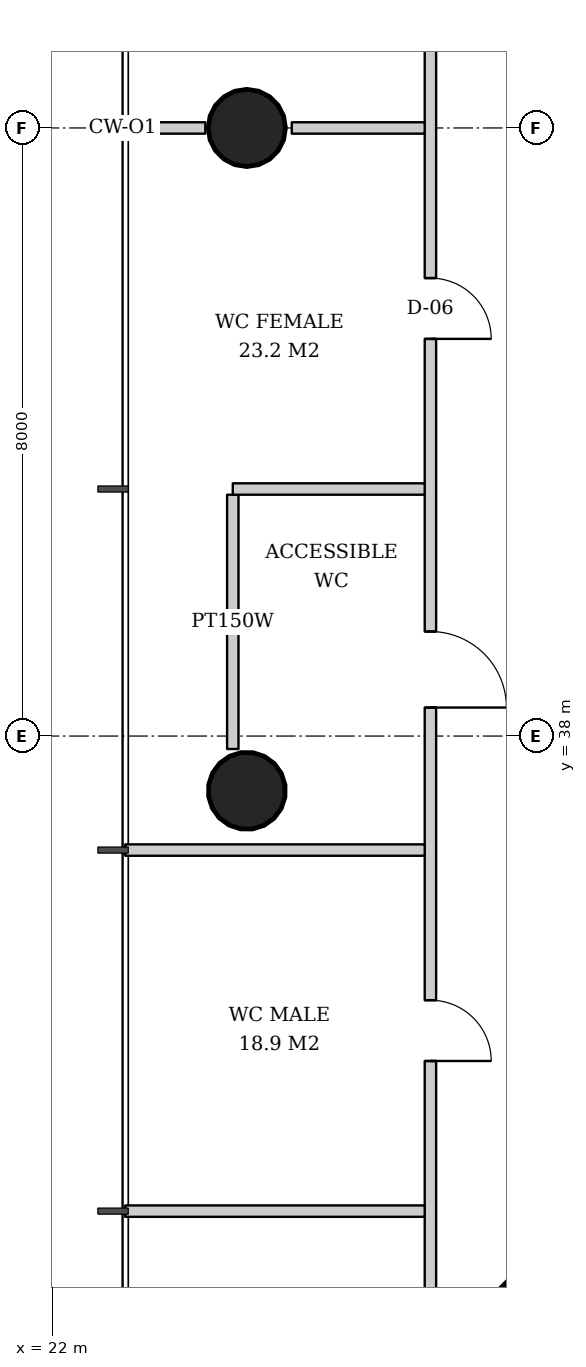
"""IFC4 building model, lengths in metres.
Left out: names, types, materials, properties, quantities, classifications, styles, units other than length and angle.
Written with IfcOpenShell. Run it as: python <this file> out.ifc"""

import sys

from ifc_helpers import new_model, si_unit, direction, frame, frame_2d, origin, origin_2d, place, context, subcontext, project, spatial, rectangle, hollow_circle, extrude, element, fill, save


model = new_model("IFC4")
c1 = context("Model", 3, precision=1e-05, world=origin(), true_north=direction((0.0, 1.0)))
c2 = subcontext(c1, "Body", "Model", "MODEL_VIEW")
j1 = project(units=[si_unit("LENGTHUNIT", "METRE"), si_unit("PLANEANGLEUNIT", "RADIAN")], contexts=[c1])
p1 = place(None, origin())
s1 = spatial("IfcSite", under=j1, at=p1, CompositionType="ELEMENT")
p2 = place(p1, origin())
s2 = spatial("IfcBuilding", under=s1, at=p2, CompositionType="ELEMENT")
p3 = place(p2, frame((0.0, 0.0, 131.2)))
s3 = spatial("IfcBuildingStorey", under=s2, at=p3, CompositionType="ELEMENT", Elevation=131.2)
p4 = place(p3, frame((28.621, 29.621, 0.0), z_axis=(0.031962158256, 0.031962158256, 0.998977898093), x_axis=(-0.707106781187, 0.707106781187, 0.0)))
e1 = element("IfcColumn", 1, at=p4, inside=s3, PredefinedType="COLUMN", context=c2, shape_type="SweptSolid", body=[
    extrude(rectangle(XDim=2.6, YDim=2.6, at=origin_2d()), origin(), (0.0, 0.0, 1.0), 3.804),
])
p5 = place(p3, frame((24.521, 46.0, 0.0), z_axis=(0.031914348339, 0.0, 0.999490607445), x_axis=(0.0, 1.0, 0.0)))
e2 = element("IfcColumn", 2, at=p5, inside=s3, PredefinedType="COLUMN", context=c2, shape_type="SweptSolid", body=[
    extrude(hollow_circle(Radius=0.508, WallThickness=0.04, at=origin_2d()), origin(), (0.0, 0.0, 1.0), 3.802),
])
p6 = place(p3, frame((24.521, 37.261, 0.0), z_axis=(0.031910269556, 0.015987237665, 0.999362868496), x_axis=(-0.447933021895, 0.894067115991, 0.0)))
e3 = element("IfcColumn", 3, at=p6, inside=s3, PredefinedType="COLUMN", context=c2, shape_type="SweptSolid", body=[
    extrude(hollow_circle(Radius=0.508, WallThickness=0.04, at=origin_2d()), origin(), (0.0, 0.0, 1.0), 3.802),
])
p7 = place(p3, frame((24.375, 41.175, 0.0), z_axis=(0.0, 0.0, 1.0), x_axis=(0.0, -1.0, 0.0)))
e4 = element("IfcWall", 4, at=p7, inside=s3, PredefinedType="PARTITIONING", context=c2, shape_type="SweptSolid", body=[
    extrude(rectangle(XDim=3.346, YDim=0.15, at=frame_2d((1.673, 0.0))), origin(), (0.0, 0.0, 1.0), 3.62),
])
p8 = place(p3, frame((26.975, 62.112, 0.0), z_axis=(0.0, 0.0, 1.0), x_axis=(0.0, -1.0, 0.0)))
e5 = element("IfcWall", 5, at=p8, inside=s3, PredefinedType="PARTITIONING", context=c2, shape_type="SweptSolid", body=[
    extrude(rectangle(XDim=32.223, YDim=0.15, at=frame_2d((16.112, 0.0))), origin(), (0.0, 0.0, 1.0), 2.72),
])
p9 = place(p8, frame((3.737, 0.0, 0.0)))
e6 = element("IfcOpeningElement", 6, at=p9, cuts=e5, PredefinedType="OPENING", context=c2, shape_type="SweptSolid", body=[
    extrude(rectangle(XDim=1.0, YDim=2.1, at=frame_2d((0.5, 1.05))), frame((0.0, 0.085, 0.0), z_axis=(0.0, -1.0, 0.0), x_axis=(1.0, 0.0, 0.0)), (0.0, 0.0, 1.0), 0.17),
])
p10 = place(p8, frame((8.487, 0.0, 0.0)))
e7 = element("IfcOpeningElement", 7, at=p10, cuts=e5, PredefinedType="OPENING", context=c2, shape_type="SweptSolid", body=[
    extrude(rectangle(XDim=1.0, YDim=2.1, at=frame_2d((0.5, 1.05))), frame((0.0, 0.085, 0.0), z_axis=(0.0, -1.0, 0.0), x_axis=(1.0, 0.0, 0.0)), (0.0, 0.0, 1.0), 0.17),
])
p11 = place(p8, frame((13.237, 0.0, 0.0)))
e8 = element("IfcOpeningElement", 8, at=p11, cuts=e5, PredefinedType="OPENING", context=c2, shape_type="SweptSolid", body=[
    extrude(rectangle(XDim=1.0, YDim=2.1, at=frame_2d((0.5, 1.05))), frame((0.0, 0.085, 0.0), z_axis=(0.0, -1.0, 0.0), x_axis=(1.0, 0.0, 0.0)), (0.0, 0.0, 1.0), 0.17),
])
p12 = place(p8, frame((18.086, 0.0, 0.0)))
e9 = element("IfcOpeningElement", 9, at=p12, cuts=e5, PredefinedType="OPENING", context=c2, shape_type="SweptSolid", body=[
    extrude(rectangle(XDim=0.8, YDim=2.1, at=frame_2d((0.4, 1.05))), frame((0.0, 0.085, 0.0), z_axis=(0.0, -1.0, 0.0), x_axis=(1.0, 0.0, 0.0)), (0.0, 0.0, 1.0), 0.17),
])
p13 = place(p8, frame((22.737, 0.0, 0.0)))
e10 = element("IfcOpeningElement", 10, at=p13, cuts=e5, PredefinedType="OPENING", context=c2, shape_type="SweptSolid", body=[
    extrude(rectangle(XDim=1.0, YDim=2.1, at=frame_2d((0.5, 1.05))), frame((0.0, 0.085, 0.0), z_axis=(0.0, -1.0, 0.0), x_axis=(1.0, 0.0, 0.0)), (0.0, 0.0, 1.0), 0.17),
])
p14 = place(p8, frame((27.586, 0.0, 0.0)))
e11 = element("IfcOpeningElement", 11, at=p14, cuts=e5, PredefinedType="OPENING", context=c2, shape_type="SweptSolid", body=[
    extrude(rectangle(XDim=0.8, YDim=2.1, at=frame_2d((0.4, 1.05))), frame((0.0, 0.085, 0.0), z_axis=(0.0, -1.0, 0.0), x_axis=(1.0, 0.0, 0.0)), (0.0, 0.0, 1.0), 0.17),
])
p15 = place(p3, frame((26.9, 46.0, 0.0), z_axis=(0.0, 0.0, 1.0), x_axis=(-1.0, 0.0, 0.0)))
e12 = element("IfcWall", 12, at=p15, inside=s3, PredefinedType="PARTITIONING", context=c2, shape_type="SweptSolid", body=[
    extrude(rectangle(XDim=1.749, YDim=0.15, at=frame_2d((0.875, 0.0))), origin(), (0.0, 0.0, 1.0), 3.62),
])
p16 = place(p3, frame((24.013, 46.0, 0.0), z_axis=(0.0, 0.0, 1.0), x_axis=(-1.0, 0.0, 0.0)))
e13 = element("IfcWall", 13, at=p16, inside=s3, PredefinedType="PARTITIONING", context=c2, shape_type="SweptSolid", body=[
    extrude(rectangle(XDim=1.053, YDim=0.15, at=frame_2d((0.527, 0.0))), origin(), (0.0, 0.0, 1.0), 3.62),
])
p17 = place(p3, frame((26.9, 41.25, 0.0), z_axis=(0.0, 0.0, 1.0), x_axis=(-1.0, 0.0, 0.0)))
e14 = element("IfcWall", 14, at=p17, inside=s3, PredefinedType="PARTITIONING", context=c2, shape_type="SweptSolid", body=[
    extrude(rectangle(XDim=2.525, YDim=0.15, at=frame_2d((1.262, 0.0))), origin(), (0.0, 0.0, 1.0), 2.82),
])
for number, where, z_axis, x_axis in (
    (15, (26.9, 36.5, 0.0), (0.0, 0.0, 1.0), (-1.0, 0.0, 0.0)),
    (16, (26.9, 31.75, 0.0), (0.0, 0.0, 1.0), (-1.0, 0.0, 0.0)),
):
    element("IfcWall", number, at=place(p3, frame(where, z_axis=z_axis, x_axis=x_axis)), inside=s3, PredefinedType="PARTITIONING", context=c2, shape_type="SweptSolid", body=[
        extrude(rectangle(XDim=3.94, YDim=0.15, at=frame_2d((1.97, 0.0))), origin(), (0.0, 0.0, 1.0), 2.82),
    ])
p18 = place(p12, origin())
e17 = element("IfcDoor", 17, at=p18, inside=s3, OperationType="SINGLE_SWING_RIGHT", PredefinedType="DOOR", context=c2, shape_type="SweptSolid", body=[
    extrude(rectangle(XDim=0.8, YDim=2.1, at=frame_2d((0.4, 1.05))), frame((0.0, 0.025, 0.0), z_axis=(0.0, -1.0, 0.0), x_axis=(1.0, 0.0, 0.0)), (0.0, 0.0, 1.0), 0.05),
])
fill(e9, e17)
p19 = place(p13, origin())
e18 = element("IfcDoor", 18, at=p19, inside=s3, OperationType="SINGLE_SWING_RIGHT", PredefinedType="DOOR", context=c2, shape_type="SweptSolid", body=[
    extrude(rectangle(XDim=1.0, YDim=2.1, at=frame_2d((0.5, 1.05))), frame((0.0, 0.025, 0.0), z_axis=(0.0, -1.0, 0.0), x_axis=(1.0, 0.0, 0.0)), (0.0, 0.0, 1.0), 0.05),
])
fill(e10, e18)
p20 = place(p14, origin())
e19 = element("IfcDoor", 19, at=p20, inside=s3, OperationType="SINGLE_SWING_RIGHT", PredefinedType="DOOR", context=c2, shape_type="SweptSolid", body=[
    extrude(rectangle(XDim=0.8, YDim=2.1, at=frame_2d((0.4, 1.05))), frame((0.0, 0.025, 0.0), z_axis=(0.0, -1.0, 0.0), x_axis=(1.0, 0.0, 0.0)), (0.0, 0.0, 1.0), 0.05),
])
fill(e11, e19)
save(model, sys.argv[1])
